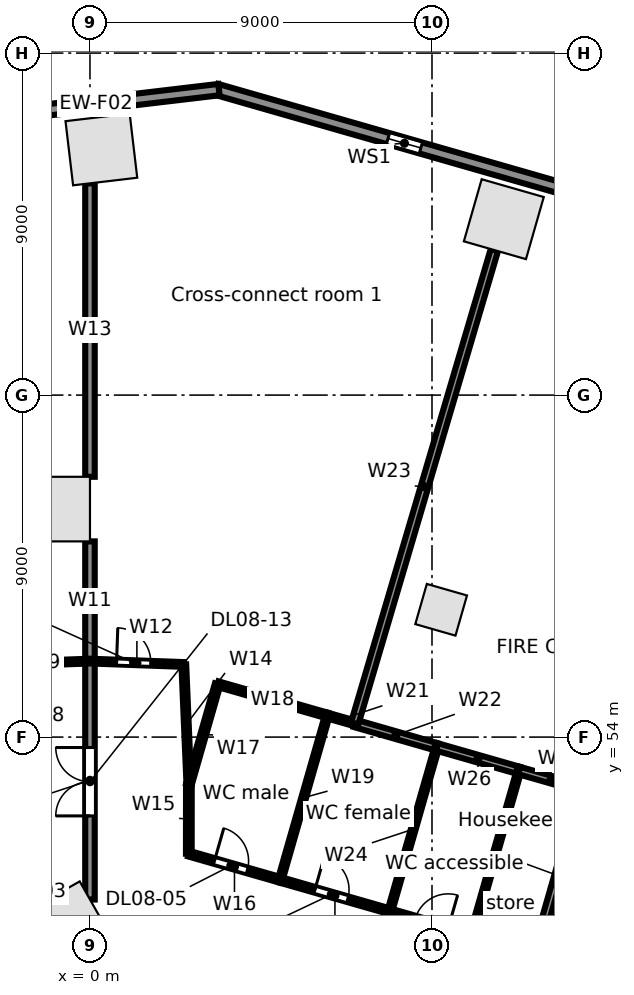
"""IFC4 building model, lengths in metres.
Left out: names, types, materials, properties, quantities, classifications, styles, units other than length and angle.
Written with IfcOpenShell. Run it as: python <this file> out.ifc"""

import sys

from ifc_helpers import new_model, si_unit, direction, frame, frame_2d, origin, origin_2d, place, context, subcontext, project, spatial, rectangle, extrude, element, fill, save


model = new_model("IFC4")
c1 = context("Model", 3, precision=1e-05, world=origin(), true_north=direction((0.0, 1.0)))
c2 = subcontext(c1, "Body", "Model", "MODEL_VIEW")
j1 = project(units=[si_unit("LENGTHUNIT", "METRE"), si_unit("PLANEANGLEUNIT", "RADIAN")], contexts=[c1])
p1 = place(None, origin())
s1 = spatial("IfcSite", under=j1, at=p1, CompositionType="ELEMENT")
p2 = place(p1, origin())
s2 = spatial("IfcBuilding", under=s1, at=p2, CompositionType="ELEMENT")
p3 = place(p2, frame((0.0, 0.0, 41.5)))
s3 = spatial("IfcBuildingStorey", under=s2, at=p3, CompositionType="ELEMENT", Elevation=41.5)
for number, where, z_axis, x_axis in (
    (1, (10.89, 67.629, 0.0), (0.0, 0.0, 1.0), (-0.961, 0.276, 0.0)),
    (2, (0.3, 69.464, 0.0), (0.0, 0.0, 1.0), (-0.993, -0.118, 0.0)),
    (3, (-0.591, 49.044, 0.0), (0.0, 0.0, 1.0), (0.87, 0.492, 0.0)),
    (4, (-0.85, 60.0, 0.0), (0.0, 0.0, 1.0), (0.0, 1.0, 0.0)),
):
    element("IfcColumn", number, at=place(p3, frame(where, z_axis=z_axis, x_axis=x_axis)), inside=s3, PredefinedType="COLUMN", context=c2, shape_type="SweptSolid", body=[
        extrude(rectangle(XDim=1.7, YDim=1.7, at=origin_2d()), origin(), (0.0, 0.0, 1.0), 5.0),
    ])
p4 = place(p3, frame((9.241, 57.35, 0.0), z_axis=(0.0, 0.0, 1.0), x_axis=(0.961261695938, -0.275637355817, 0.0)))
e5 = element("IfcColumn", 5, at=p4, inside=s3, PredefinedType="COLUMN", context=c2, shape_type="SweptSolid", body=[
    extrude(rectangle(XDim=1.1, YDim=1.1, at=origin_2d()), origin(), (0.0, 0.0, 1.0), 5.0),
])
p5 = place(p3, frame((3.335, 71.044, 0.0), z_axis=(0.0, 0.0, 1.0), x_axis=(0.961260130989, -0.275642813387, 0.0)))
e6 = element("IfcWall", 6, at=p5, inside=s3, PredefinedType="STANDARD", context=c2, shape_type="SweptSolid", body=[
    extrude(rectangle(XDim=32.741, YDim=0.3, at=frame_2d((16.371, 0.0))), origin(), (0.0, 0.0, 1.0), 4.68),
])
p6 = place(p5, frame((29.207, 0.0, 0.6)))
e7 = element("IfcOpeningElement", 7, at=p6, cuts=e6, PredefinedType="OPENING", context=c2, shape_type="SweptSolid", body=[
    extrude(rectangle(XDim=0.9, YDim=3.2, at=frame_2d((0.45, 1.6))), frame((0.0, 0.16, 0.0), z_axis=(0.0, -1.0, 0.0), x_axis=(1.0, 0.0, 0.0)), (0.0, 0.0, 1.0), 0.32),
])
p7 = place(p5, frame((21.034, 0.0, 0.6)))
e8 = element("IfcOpeningElement", 8, at=p7, cuts=e6, PredefinedType="OPENING", context=c2, shape_type="SweptSolid", body=[
    extrude(rectangle(XDim=0.9, YDim=3.2, at=frame_2d((0.45, 1.6))), frame((0.0, 0.16, 0.0), z_axis=(0.0, -1.0, 0.0), x_axis=(1.0, 0.0, 0.0)), (0.0, 0.0, 1.0), 0.32),
])
p8 = place(p5, frame((12.861, 0.0, 0.6)))
e9 = element("IfcOpeningElement", 9, at=p8, cuts=e6, PredefinedType="OPENING", context=c2, shape_type="SweptSolid", body=[
    extrude(rectangle(XDim=0.9, YDim=3.2, at=frame_2d((0.45, 1.6))), frame((0.0, 0.16, 0.0), z_axis=(0.0, -1.0, 0.0), x_axis=(1.0, 0.0, 0.0)), (0.0, 0.0, 1.0), 0.32),
])
p9 = place(p5, frame((4.688, 0.0, 0.6)))
e10 = element("IfcOpeningElement", 10, at=p9, cuts=e6, PredefinedType="OPENING", context=c2, shape_type="SweptSolid", body=[
    extrude(rectangle(XDim=0.9, YDim=3.2, at=frame_2d((0.45, 1.6))), frame((0.0, 0.16, 0.0), z_axis=(0.0, -1.0, 0.0), x_axis=(1.0, 0.0, 0.0)), (0.0, 0.0, 1.0), 0.32),
])
p10 = place(p3, frame((-3.076, 70.273, 0.0), z_axis=(0.0, 0.0, 1.0), x_axis=(0.993067743007, 0.117543429416, 0.0)))
e11 = element("IfcWall", 11, at=p10, inside=s3, PredefinedType="STANDARD", context=c2, shape_type="SweptSolid", body=[
    extrude(rectangle(XDim=6.516, YDim=0.3, at=frame_2d((3.258, 0.0))), origin(), (0.0, 0.0, 1.0), 4.68),
])
p11 = place(p3, frame((-2.67, 55.904, 0.0), z_axis=(0.0, 0.0, 1.0), x_axis=(0.999354913865, 0.03591317494, 0.0)))
e12 = element("IfcWall", 12, at=p11, inside=s3, PredefinedType="PARTITIONING", context=c2, shape_type="SweptSolid", body=[
    extrude(rectangle(XDim=2.672, YDim=0.125, at=frame_2d((1.336, 0.0))), origin(), (0.0, 0.0, 1.0), 3.742),
])
p12 = place(p3, frame((0.0, 49.726, 0.0), z_axis=(0.0, 0.0, 1.0), x_axis=(0.0, 1.0, 0.0)))
e13 = element("IfcWall", 13, at=p12, inside=s3, PredefinedType="PARTITIONING", context=c2, shape_type="SweptSolid", body=[
    extrude(rectangle(XDim=6.274, YDim=0.25, at=frame_2d((3.137, 0.0))), origin(), (0.0, 0.0, 1.0), 4.68),
])
p13 = place(p12, frame((2.2, 0.0, 0.0)))
e14 = element("IfcOpeningElement", 14, at=p13, cuts=e13, PredefinedType="OPENING", context=c2, shape_type="SweptSolid", body=[
    extrude(rectangle(XDim=1.8, YDim=2.1, at=frame_2d((0.9, 1.05))), frame((0.0, 0.135, 0.0), z_axis=(0.0, -1.0, 0.0), x_axis=(1.0, 0.0, 0.0)), (0.0, 0.0, 1.0), 0.27),
])
p14 = place(p3, frame((0.0, 56.0, 0.0), z_axis=(0.0, 0.0, 1.0), x_axis=(0.0, 1.0, 0.0)))
e15 = element("IfcWall", 15, at=p14, inside=s3, PredefinedType="PARTITIONING", context=c2, shape_type="SweptSolid", body=[
    extrude(rectangle(XDim=3.15, YDim=0.25, at=frame_2d((1.575, 0.0))), origin(), (0.0, 0.0, 1.0), 4.68),
])
p15 = place(p3, frame((0.0, 56.0, 0.0), z_axis=(0.0, 0.0, 1.0), x_axis=(0.999349313684, -0.036068673934, 0.0)))
e16 = element("IfcWall", 16, at=p15, inside=s3, PredefinedType="PARTITIONING", context=c2, shape_type="SweptSolid", body=[
    extrude(rectangle(XDim=2.471, YDim=0.125, at=frame_2d((1.235, 0.0))), origin(), (0.0, 0.0, 1.0), 4.68),
])
p16 = place(p15, frame((0.7, 0.0, 0.0)))
e17 = element("IfcOpeningElement", 17, at=p16, cuts=e16, PredefinedType="OPENING", context=c2, shape_type="SweptSolid", body=[
    extrude(rectangle(XDim=0.9, YDim=2.1, at=frame_2d((0.45, 1.05))), frame((0.0, 0.073, 0.0), z_axis=(0.0, -1.0, 0.0), x_axis=(1.0, 0.0, 0.0)), (0.0, 0.0, 1.0), 0.145),
])
p17 = place(p3, frame((0.0, 60.85, 0.0), z_axis=(0.0, 0.0, 1.0), x_axis=(0.0, 1.0, 0.0)))
e18 = element("IfcWall", 18, at=p17, inside=s3, PredefinedType="PARTITIONING", context=c2, shape_type="SweptSolid", body=[
    extrude(rectangle(XDim=7.723, YDim=0.25, at=frame_2d((3.861, 0.0))), origin(), (0.0, 0.0, 1.0), 3.952),
])
p18 = place(p3, frame((2.469, 55.911, 0.0), z_axis=(0.0, 0.0, 1.0), x_axis=(0.042391721597, -0.99910106693, 0.0)))
e19 = element("IfcWall", 19, at=p18, inside=s3, PredefinedType="PARTITIONING", context=c2, shape_type="SweptSolid", body=[
    extrude(rectangle(XDim=3.162, YDim=0.125, at=frame_2d((1.581, 0.0))), origin(), (0.0, 0.0, 1.0), 4.68),
])
p19 = place(p3, frame((2.601, 50.932, 0.0), z_axis=(0.0, 0.0, 1.0), x_axis=(0.001073104681, 0.999999424223, 0.0)))
e20 = element("IfcWall", 20, at=p19, inside=s3, PredefinedType="PARTITIONING", context=c2, shape_type="SweptSolid", body=[
    extrude(rectangle(XDim=1.82, YDim=0.15, at=frame_2d((0.91, 0.0))), origin(), (0.0, 0.0, 1.0), 4.68),
])
p20 = place(p3, frame((2.601, 50.932, 0.0), z_axis=(0.0, 0.0, 1.0), x_axis=(0.961265528111, -0.275623991092, 0.0)))
e21 = element("IfcWall", 21, at=p20, inside=s3, PredefinedType="PARTITIONING", context=c2, shape_type="SweptSolid", body=[
    extrude(rectangle(XDim=2.5, YDim=0.15, at=frame_2d((1.25, 0.0))), origin(), (0.0, 0.0, 1.0), 4.68),
])
p21 = place(p20, frame((0.7, 0.0, 0.0)))
e22 = element("IfcOpeningElement", 22, at=p21, cuts=e21, PredefinedType="OPENING", context=c2, shape_type="SweptSolid", body=[
    extrude(rectangle(XDim=0.9, YDim=2.1, at=frame_2d((0.45, 1.05))), frame((0.0, 0.085, 0.0), z_axis=(0.0, -1.0, 0.0), x_axis=(1.0, 0.0, 0.0)), (0.0, 0.0, 1.0), 0.17),
])
p22 = place(p3, frame((2.603, 52.752, 0.0), z_axis=(0.0, 0.0, 1.0), x_axis=(0.27569433145, 0.961245356611, 0.0)))
e23 = element("IfcWall", 23, at=p22, inside=s3, PredefinedType="PARTITIONING", context=c2, shape_type="SweptSolid", body=[
    extrude(rectangle(XDim=2.75, YDim=0.15, at=frame_2d((1.375, 0.0))), origin(), (0.0, 0.0, 1.0), 4.68),
])
p23 = place(p3, frame((3.361, 55.395, 0.0), z_axis=(0.0, 0.0, 1.0), x_axis=(0.961268664977, -0.27561305073, 0.0)))
e24 = element("IfcWall", 24, at=p23, inside=s3, PredefinedType="PARTITIONING", context=c2, shape_type="SweptSolid", body=[
    extrude(rectangle(XDim=3.0, YDim=0.15, at=frame_2d((1.5, 0.0))), origin(), (0.0, 0.0, 1.0), 4.68),
])
p24 = place(p3, frame((5.004, 50.243, 0.0), z_axis=(0.0, 0.0, 1.0), x_axis=(0.275838825927, 0.961203902464, 0.0)))
e25 = element("IfcWall", 25, at=p24, inside=s3, PredefinedType="PARTITIONING", context=c2, shape_type="SweptSolid", body=[
    extrude(rectangle(XDim=4.5, YDim=0.125, at=frame_2d((2.25, 0.0))), origin(), (0.0, 0.0, 1.0), 4.68),
])
p25 = place(p3, frame((5.004, 50.243, 0.0), z_axis=(0.0, 0.0, 1.0), x_axis=(0.961268664977, -0.27561305073, 0.0)))
e26 = element("IfcWall", 26, at=p25, inside=s3, PredefinedType="PARTITIONING", context=c2, shape_type="SweptSolid", body=[
    extrude(rectangle(XDim=3.0, YDim=0.15, at=frame_2d((1.5, 0.0))), origin(), (0.0, 0.0, 1.0), 4.68),
])
p26 = place(p25, frame((0.95, 0.0, 0.0)))
e27 = element("IfcOpeningElement", 27, at=p26, cuts=e26, PredefinedType="OPENING", context=c2, shape_type="SweptSolid", body=[
    extrude(rectangle(XDim=0.9, YDim=2.1, at=frame_2d((0.45, 1.05))), frame((0.0, 0.085, 0.0), z_axis=(0.0, -1.0, 0.0), x_axis=(1.0, 0.0, 0.0)), (0.0, 0.0, 1.0), 0.17),
])
p27 = place(p3, frame((6.245, 54.568, 0.0), z_axis=(0.0, 0.0, 1.0), x_axis=(0.961499370144, -0.274807134575, 0.0)))
e28 = element("IfcWall", 28, at=p27, inside=s3, PredefinedType="PARTITIONING", context=c2, shape_type="SweptSolid", body=[
    extrude(rectangle(XDim=0.75, YDim=0.15, at=frame_2d((0.375, 0.0))), origin(), (0.0, 0.0, 1.0), 4.68),
])
p28 = place(p3, frame((6.966, 54.362, 0.0), z_axis=(0.0, 0.0, 1.0), x_axis=(0.961154610169, -0.276010534854, 0.0)))
e29 = element("IfcWall", 29, at=p28, inside=s3, PredefinedType="PARTITIONING", context=c2, shape_type="SweptSolid", body=[
    extrude(rectangle(XDim=2.25, YDim=0.2, at=frame_2d((1.125, 0.0))), origin(), (0.0, 0.0, 1.0), 3.852),
])
p29 = place(p3, frame((6.966, 54.362, 0.0), z_axis=(0.0, 0.0, 1.0), x_axis=(0.283027392509, 0.959111826165, 0.0)))
e30 = element("IfcWall", 30, at=p29, inside=s3, PredefinedType="PARTITIONING", context=c2, shape_type="SweptSolid", body=[
    extrude(rectangle(XDim=12.985, YDim=0.2, at=frame_2d((6.492, 0.0))), origin(), (0.0, 0.0, 1.0), 3.742),
])
p30 = place(p3, frame((7.888, 49.416, 0.0), z_axis=(0.0, 0.0, 1.0), x_axis=(0.275803080638, 0.96121415965, 0.0)))
e31 = element("IfcWall", 31, at=p30, inside=s3, PredefinedType="PARTITIONING", context=c2, shape_type="SweptSolid", body=[
    extrude(rectangle(XDim=4.5, YDim=0.125, at=frame_2d((2.25, 0.0))), origin(), (0.0, 0.0, 1.0), 3.852),
])
p31 = place(p3, frame((7.888, 49.416, 0.0), z_axis=(0.0, 0.0, 1.0), x_axis=(0.9611628742, -0.275981755301, 0.0)))
e32 = element("IfcWall", 32, at=p31, inside=s3, PredefinedType="PARTITIONING", context=c2, shape_type="SweptSolid", body=[
    extrude(rectangle(XDim=2.25, YDim=0.15, at=frame_2d((1.125, 0.0))), origin(), (0.0, 0.0, 1.0), 3.742),
])
p32 = place(p31, frame((0.7, 0.0, 0.0)))
e33 = element("IfcOpeningElement", 33, at=p32, cuts=e32, PredefinedType="OPENING", context=c2, shape_type="SweptSolid", body=[
    extrude(rectangle(XDim=0.9, YDim=2.1, at=frame_2d((0.45, 1.05))), frame((0.0, 0.085, 0.0), z_axis=(0.0, -1.0, 0.0), x_axis=(1.0, 0.0, 0.0)), (0.0, 0.0, 1.0), 0.17),
])
p33 = place(p3, frame((9.129, 53.741, 0.0), z_axis=(0.0, 0.0, 1.0), x_axis=(0.961273691875, -0.275595517578, 0.0)))
e34 = element("IfcWall", 34, at=p33, inside=s3, PredefinedType="PARTITIONING", context=c2, shape_type="SweptSolid", body=[
    extrude(rectangle(XDim=2.249, YDim=0.2, at=frame_2d((1.125, 0.0))), origin(), (0.0, 0.0, 1.0), 3.742),
])
p34 = place(p3, frame((10.051, 48.795, 0.0), z_axis=(0.0, 0.0, 1.0), x_axis=(0.275530671241, 0.961292280841, 0.0)))
e35 = element("IfcWall", 35, at=p34, inside=s3, PredefinedType="PARTITIONING", context=c2, shape_type="SweptSolid", body=[
    extrude(rectangle(XDim=4.5, YDim=0.125, at=frame_2d((2.25, 0.0))), origin(), (0.0, 0.0, 1.0), 4.68),
])
p35 = place(p3, frame((11.291, 53.121, 0.0), z_axis=(0.0, 0.0, 1.0), x_axis=(0.961329010357, -0.275402494264, 0.0)))
e36 = element("IfcWall", 36, at=p35, inside=s3, PredefinedType="PARTITIONING", context=c2, shape_type="SweptSolid", body=[
    extrude(rectangle(XDim=1.751, YDim=0.2, at=frame_2d((0.875, 0.0))), origin(), (0.0, 0.0, 1.0), 4.68),
])
p36 = place(p3, frame((11.733, 48.313, 0.0), z_axis=(0.0, 0.0, 1.0), x_axis=(0.275795676316, 0.961216284155, 0.0)))
e37 = element("IfcWall", 37, at=p36, inside=s3, PredefinedType="PARTITIONING", context=c2, shape_type="SweptSolid", body=[
    extrude(rectangle(XDim=4.5, YDim=0.2, at=frame_2d((2.25, 0.0))), origin(), (0.0, 0.0, 1.0), 4.68),
])
p37 = place(p9, origin())
e38 = element("IfcWindow", 38, at=p37, inside=s3, PartitioningType="SINGLE_PANEL", PredefinedType="WINDOW", context=c2, shape_type="SweptSolid", body=[
    extrude(rectangle(XDim=0.9, YDim=3.2, at=frame_2d((0.45, 1.6))), frame((0.0, 0.03, 0.0), z_axis=(0.0, -1.0, 0.0), x_axis=(1.0, 0.0, 0.0)), (0.0, 0.0, 1.0), 0.06),
])
fill(e10, e38)
p38 = place(p21, origin())
e39 = element("IfcDoor", 39, at=p38, inside=s3, OperationType="SINGLE_SWING_LEFT", PredefinedType="DOOR", context=c2, shape_type="SweptSolid", body=[
    extrude(rectangle(XDim=0.9, YDim=2.1, at=frame_2d((0.45, 1.05))), frame((0.0, 0.025, 0.0), z_axis=(0.0, -1.0, 0.0), x_axis=(1.0, 0.0, 0.0)), (0.0, 0.0, 1.0), 0.05),
])
fill(e22, e39)
p39 = place(p26, origin())
e40 = element("IfcDoor", 40, at=p39, inside=s3, OperationType="SINGLE_SWING_LEFT", PredefinedType="DOOR", context=c2, shape_type="SweptSolid", body=[
    extrude(rectangle(XDim=0.9, YDim=2.1, at=frame_2d((0.45, 1.05))), frame((0.0, 0.025, 0.0), z_axis=(0.0, -1.0, 0.0), x_axis=(1.0, 0.0, 0.0)), (0.0, 0.0, 1.0), 0.05),
])
fill(e27, e40)
p40 = place(p16, origin())
e41 = element("IfcDoor", 41, at=p40, inside=s3, OperationType="SINGLE_SWING_LEFT", PredefinedType="DOOR", context=c2, shape_type="SweptSolid", body=[
    extrude(rectangle(XDim=0.9, YDim=2.1, at=frame_2d((0.45, 1.05))), frame((0.0, 0.025, 0.0), z_axis=(0.0, -1.0, 0.0), x_axis=(1.0, 0.0, 0.0)), (0.0, 0.0, 1.0), 0.05),
])
fill(e17, e41)
p41 = place(p13, origin())
e42 = element("IfcDoor", 42, at=p41, inside=s3, OperationType="DOUBLE_DOOR_SINGLE_SWING", PredefinedType="DOOR", context=c2, shape_type="SweptSolid", body=[
    extrude(rectangle(XDim=1.8, YDim=2.1, at=frame_2d((0.9, 1.05))), frame((0.0, 0.025, 0.0), z_axis=(0.0, -1.0, 0.0), x_axis=(1.0, 0.0, 0.0)), (0.0, 0.0, 1.0), 0.05),
])
fill(e14, e42)
save(model, sys.argv[1])
